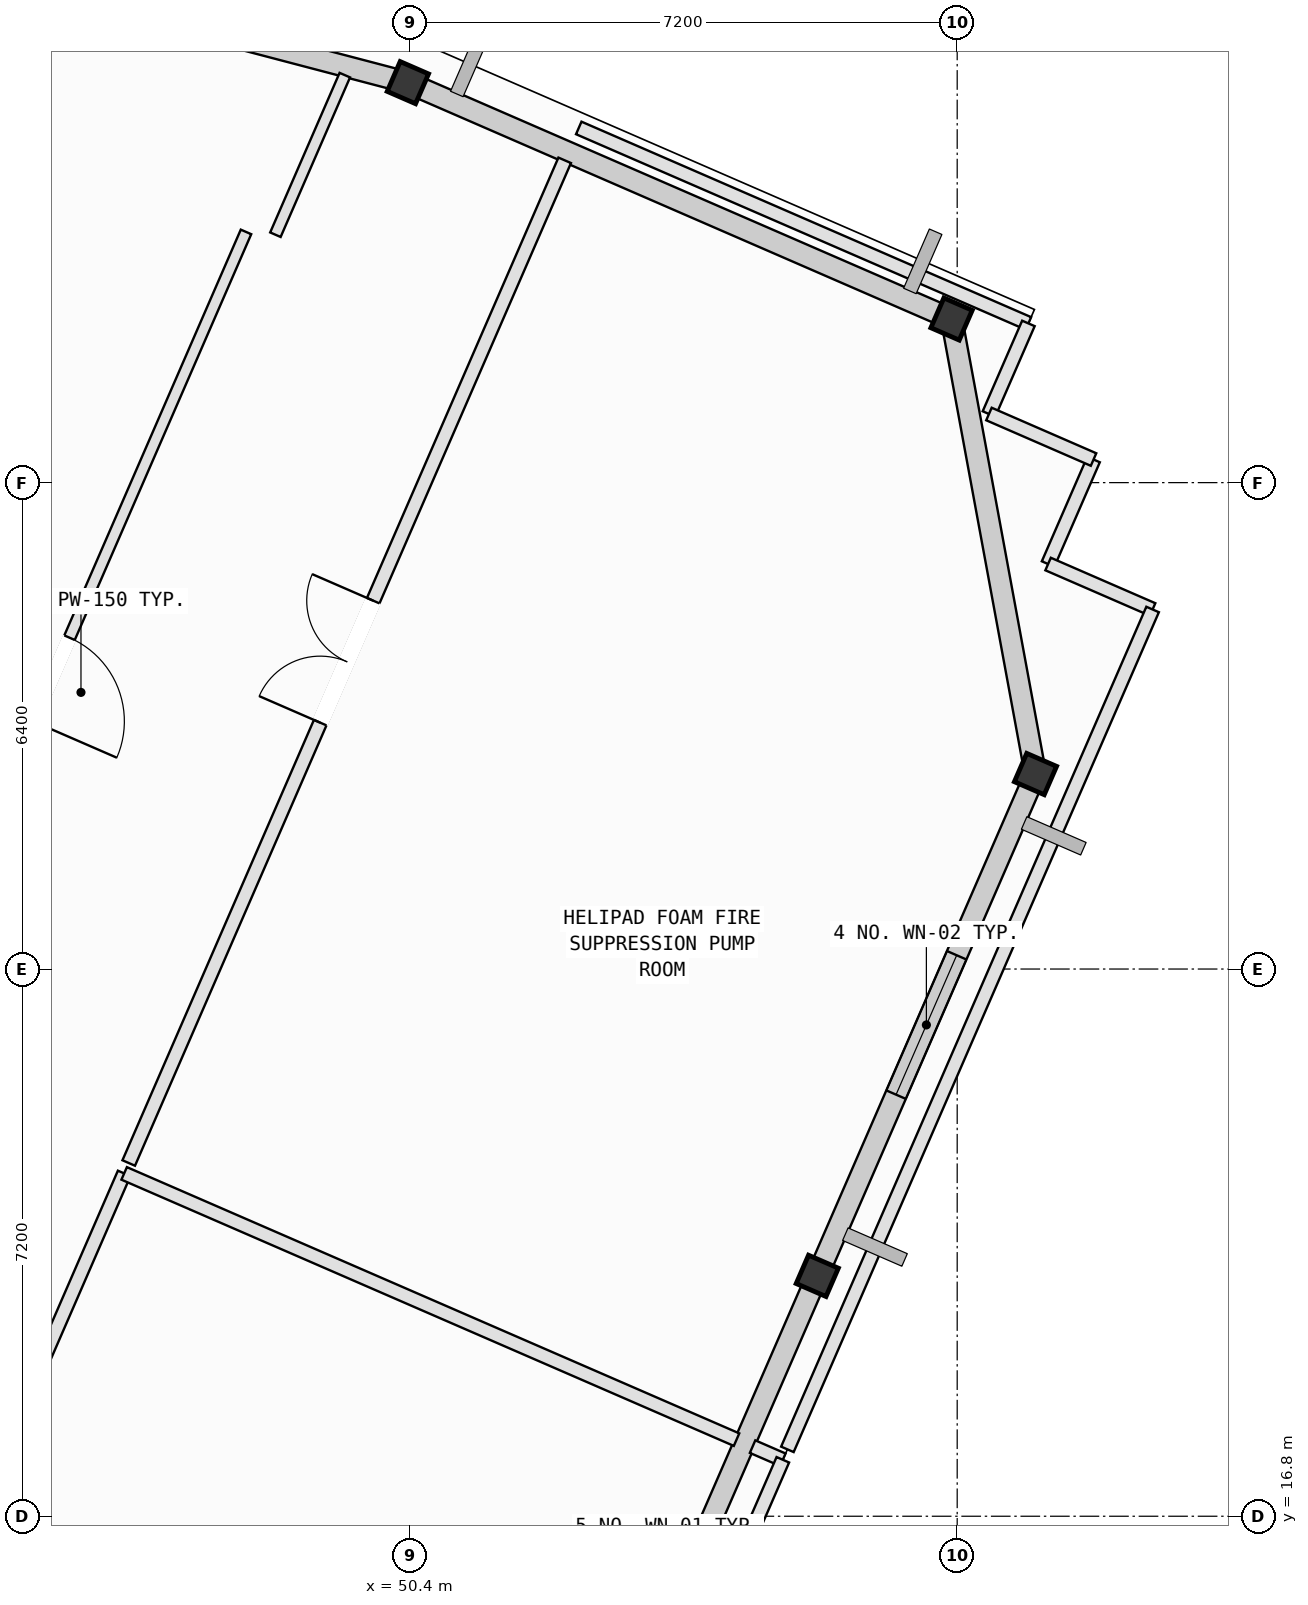
"""IFC4 building model, lengths in metres.
Left out: names, types, materials, properties, quantities, classifications, styles, units other than length and angle.
Written with IfcOpenShell. Run it as: python <this file> out.ifc"""

import sys

from ifc_helpers import new_model, si_unit, direction, frame, frame_2d, origin, origin_2d, place, context, subcontext, project, spatial, rectangle, i_section, extrude, element, fill, save


model = new_model("IFC4")
c1 = context("Model", 3, precision=1e-05, world=origin(), true_north=direction((0.0, 1.0)))
c2 = subcontext(c1, "Body", "Model", "MODEL_VIEW")
j1 = project(units=[si_unit("LENGTHUNIT", "METRE"), si_unit("PLANEANGLEUNIT", "RADIAN")], contexts=[c1])
p1 = place(None, origin())
s1 = spatial("IfcSite", under=j1, at=p1, CompositionType="ELEMENT")
p2 = place(p1, origin())
s2 = spatial("IfcBuilding", under=s1, at=p2, CompositionType="ELEMENT")
p3 = place(p2, frame((0.0, 0.0, 342.6)))
s3 = spatial("IfcBuildingStorey", under=s2, at=p3, CompositionType="ELEMENT", Elevation=342.6)
for number, where, z_axis, x_axis in (
    (1, (55.759, 19.963, 0.002), (0.0, 0.0, 1.0), (0.399, 0.917, 0.0)),
    (2, (58.63, 26.566, 0.002), (0.0, 0.0, 1.0), (0.399, 0.917, 0.0)),
    (3, (57.526, 32.553, 0.002), (0.0, 0.0, 1.0), (-0.917, 0.399, 0.0)),
    (4, (50.373, 35.663, 0.002), (0.0, 0.0, 1.0), (-0.917, 0.399, 0.0)),
):
    element("IfcColumn", number, at=place(p3, frame(where, z_axis=z_axis, x_axis=x_axis)), inside=s3, PredefinedType="COLUMN", context=c2, shape_type="SweptSolid", body=[
        extrude(i_section(OverallWidth=0.407, OverallDepth=0.428, WebThickness=0.02, FlangeThickness=0.035, FilletRadius=0.022, at=origin_2d()), origin(), (0.0, 0.0, 1.0), 5.196),
    ])
p4 = place(p3, frame((55.759, 19.963, 0.0), z_axis=(0.0, 0.0, 1.0), x_axis=(-0.398734790782, -0.917066282566, 0.0)))
e5 = element("IfcWall", 5, at=p4, inside=s3, PredefinedType="SOLIDWALL", context=c2, shape_type="SweptSolid", body=[
    extrude(rectangle(XDim=7.2, YDim=0.28, at=frame_2d((3.6, 0.0))), origin(), (0.0, 0.0, 1.0), 4.335),
])
p5 = place(p4, frame((4.112, 0.0, 0.75)))
e6 = element("IfcOpeningElement", 6, at=p5, cuts=e5, PredefinedType="OPENING", context=c2, shape_type="SweptSolid", body=[
    extrude(rectangle(XDim=1.6, YDim=1.95, at=frame_2d((0.8, 0.975))), frame((0.0, 0.15, 0.0), z_axis=(0.0, -1.0, 0.0), x_axis=(1.0, 0.0, 0.0)), (0.0, 0.0, 1.0), 0.3),
])
p6 = place(p3, frame((58.63, 26.566, 0.0), z_axis=(0.0, 0.0, 1.0), x_axis=(-0.398763307949, -0.91705388295, 0.0)))
e7 = element("IfcWall", 7, at=p6, inside=s3, PredefinedType="SOLIDWALL", context=c2, shape_type="SweptSolid", body=[
    extrude(rectangle(XDim=7.2, YDim=0.28, at=frame_2d((3.6, 0.0))), origin(), (0.0, 0.0, 1.0), 4.335),
])
p7 = place(p6, frame((2.6, 0.0, 0.75)))
e8 = element("IfcOpeningElement", 8, at=p7, cuts=e7, PredefinedType="OPENING", context=c2, shape_type="SweptSolid", body=[
    extrude(rectangle(XDim=2.0, YDim=1.95, at=frame_2d((1.0, 0.975))), frame((0.0, 0.15, 0.0), z_axis=(0.0, -1.0, 0.0), x_axis=(1.0, 0.0, 0.0)), (0.0, 0.0, 1.0), 0.3),
])
p8 = place(p3, frame((57.526, 32.552, 0.0), z_axis=(0.0, 0.0, 1.0), x_axis=(0.181386981443, -0.983411797246, 0.0)))
e9 = element("IfcWall", 9, at=p8, inside=s3, PredefinedType="SOLIDWALL", context=c2, shape_type="SweptSolid", body=[
    extrude(rectangle(XDim=6.088, YDim=0.28, at=frame_2d((3.044, 0.0))), origin(), (0.0, 0.0, 1.0), 4.335),
])
p9 = place(p3, frame((50.373, 35.663, 0.0), z_axis=(0.0, 0.0, 1.0), x_axis=(0.917055127211, -0.398760446454, 0.0)))
e10 = element("IfcWall", 10, at=p9, inside=s3, PredefinedType="SOLIDWALL", context=c2, shape_type="SweptSolid", body=[
    extrude(rectangle(XDim=7.8, YDim=0.28, at=frame_2d((3.9, 0.0))), origin(), (0.0, 0.0, 1.0), 4.335),
])
p10 = place(p3, frame((40.879, 38.155, 0.0), z_axis=(0.0, 0.0, 1.0), x_axis=(0.967228369271, -0.253908018143, 0.0)))
e11 = element("IfcWall", 11, at=p10, inside=s3, PredefinedType="SOLIDWALL", context=c2, shape_type="SweptSolid", body=[
    extrude(rectangle(XDim=9.815, YDim=0.28, at=frame_2d((4.908, 0.0))), origin(), (0.0, 0.0, 1.0), 4.335),
])
p11 = place(p3, frame((44.32, 15.975, 0.0), z_axis=(0.0, 0.0, 1.0), x_axis=(0.398704630949, 0.917079395287, 0.0)))
e12 = element("IfcWall", 12, at=p11, inside=s3, PredefinedType="PARTITIONING", context=c2, shape_type="SweptSolid", body=[
    extrude(rectangle(XDim=5.818, YDim=0.18, at=frame_2d((2.909, 0.0))), origin(), (0.0, 0.0, 1.0), 4.485),
])
p12 = place(p3, frame((46.64, 21.311, 0.0), z_axis=(0.0, 0.0, 1.0), x_axis=(0.917077124734, -0.398709853514, 0.0)))
e13 = element("IfcWall", 13, at=p12, inside=s3, PredefinedType="PARTITIONING", context=c2, shape_type="SweptSolid", body=[
    extrude(rectangle(XDim=8.786, YDim=0.18, at=frame_2d((4.393, 0.0))), origin(), (0.0, 0.0, 1.0), 4.85),
])
p13 = place(p3, frame((54.908, 17.716, 0.0), z_axis=(0.0, 0.0, 1.0), x_axis=(0.917007436542, -0.398870105833, 0.0)))
e14 = element("IfcWall", 14, at=p13, inside=s3, PredefinedType="PARTITIONING", context=c2, shape_type="SweptSolid", body=[
    extrude(rectangle(XDim=0.434, YDim=0.18, at=frame_2d((0.217, 0.0))), origin(), (0.0, 0.0, 1.0), 4.85),
])
p14 = place(p3, frame((55.306, 17.543, 0.0), z_axis=(0.0, 0.0, 1.0), x_axis=(-0.398733054763, -0.917067037375, 0.0)))
e15 = element("IfcWall", 15, at=p14, inside=s3, PredefinedType="PARTITIONING", context=c2, shape_type="SweptSolid", body=[
    extrude(rectangle(XDim=27.0, YDim=0.18, at=frame_2d((13.5, 0.0))), origin(), (0.0, 0.0, 1.0), 4.85),
])
for number, where, z_axis, x_axis in (
    (16, (59.394, 30.704, 0.0), (0.0, 0.0, 1.0), (-0.399, -0.917, 0.0)),
    (17, (58.796, 29.329, 0.0), (0.0, 0.0, 1.0), (0.917, -0.399, 0.0)),
):
    element("IfcWall", number, at=place(p3, frame(where, z_axis=z_axis, x_axis=x_axis)), inside=s3, PredefinedType="PARTITIONING", context=c2, shape_type="SweptSolid", body=[
        extrude(rectangle(XDim=1.5, YDim=0.18, at=frame_2d((0.75, 0.0))), origin(), (0.0, 0.0, 1.0), 4.85),
    ])
p15 = place(p3, frame((60.171, 28.731, 0.0), z_axis=(0.0, 0.0, 1.0), x_axis=(-0.398735742108, -0.917065868935, 0.0)))
e18 = element("IfcWall", 18, at=p15, inside=s3, PredefinedType="PARTITIONING", context=c2, shape_type="SweptSolid", body=[
    extrude(rectangle(XDim=12.051, YDim=0.18, at=frame_2d((6.025, 0.0))), origin(), (0.0, 0.0, 1.0), 4.85),
])
p16 = place(p3, frame((46.7, 21.448, 0.0), z_axis=(0.0, 0.0, 1.0), x_axis=(0.398723008689, 0.917071405258, 0.0)))
e19 = element("IfcWall", 19, at=p16, inside=s3, PredefinedType="PARTITIONING", context=c2, shape_type="SweptSolid", body=[
    extrude(rectangle(XDim=14.386, YDim=0.18, at=frame_2d((7.193, 0.0))), origin(), (0.0, 0.0, 1.0), 4.85),
])
p17 = place(p16, frame((6.318, 0.0, 0.0)))
e20 = element("IfcOpeningElement", 20, at=p17, cuts=e19, PredefinedType="OPENING", context=c2, shape_type="SweptSolid", body=[
    extrude(rectangle(XDim=1.75, YDim=2.2, at=frame_2d((0.875, 1.1))), frame((0.0, 0.1, 0.0), z_axis=(0.0, -1.0, 0.0), x_axis=(1.0, 0.0, 0.0)), (0.0, 0.0, 1.0), 0.2),
])
p18 = place(p3, frame((52.621, 35.067, 0.0), z_axis=(0.0, 0.0, 1.0), x_axis=(0.917092918999, -0.398673522975, 0.0)))
e21 = element("IfcWall", 21, at=p18, inside=s3, PredefinedType="PARTITIONING", context=c2, shape_type="SweptSolid", body=[
    extrude(rectangle(XDim=6.451, YDim=0.18, at=frame_2d((3.226, 0.0))), origin(), (0.0, 0.0, 1.0), 4.335),
])
p19 = place(p3, frame((58.537, 32.495, 0.0), z_axis=(0.0, 0.0, 1.0), x_axis=(-0.3991929402, -0.916866945906, 0.0)))
e22 = element("IfcWall", 22, at=p19, inside=s3, PredefinedType="PARTITIONING", context=c2, shape_type="SweptSolid", body=[
    extrude(rectangle(XDim=1.3, YDim=0.18, at=frame_2d((0.65, 0.0))), origin(), (0.0, 0.0, 1.0), 4.85),
])
p20 = place(p3, frame((58.018, 31.303, 0.0), z_axis=(0.0, 0.0, 1.0), x_axis=(0.91691738696, -0.399077067107, 0.0)))
e23 = element("IfcWall", 23, at=p20, inside=s3, PredefinedType="PARTITIONING", context=c2, shape_type="SweptSolid", body=[
    extrude(rectangle(XDim=1.501, YDim=0.18, at=frame_2d((0.75, 0.0))), origin(), (0.0, 0.0, 1.0), 4.85),
])
p21 = place(p3, frame((48.243, 33.699, 0.0), z_axis=(0.0, 0.0, 1.0), x_axis=(-0.398758777505, -0.917055852913, 0.0)))
e24 = element("IfcWall", 24, at=p21, inside=s3, PredefinedType="PARTITIONING", context=c2, shape_type="SweptSolid", body=[
    extrude(rectangle(XDim=12.844, YDim=0.15, at=frame_2d((6.422, 0.0))), origin(), (0.0, 0.0, 1.0), 3.835),
])
p22 = place(p21, frame((5.822, 0.0, 0.0)))
e25 = element("IfcOpeningElement", 25, at=p22, cuts=e24, PredefinedType="OPENING", context=c2, shape_type="SweptSolid", body=[
    extrude(rectangle(XDim=1.2, YDim=2.15, at=frame_2d((0.6, 1.075))), frame((0.0, 0.085, 0.0), z_axis=(0.0, -1.0, 0.0), x_axis=(1.0, 0.0, 0.0)), (0.0, 0.0, 1.0), 0.17),
])
p23 = place(p3, frame((49.543, 35.762, 0.0), z_axis=(0.0, 0.0, 1.0), x_axis=(-0.398765098315, -0.917053104441, 0.0)))
e26 = element("IfcWall", 26, at=p23, inside=s3, PredefinedType="PARTITIONING", context=c2, shape_type="SweptSolid", body=[
    extrude(rectangle(XDim=2.29, YDim=0.15, at=frame_2d((1.145, 0.0))), origin(), (0.0, 0.0, 1.0), 3.835),
])
p24 = place(p7, origin())
e27 = element("IfcWindow", 27, at=p24, inside=s3, PartitioningType="SINGLE_PANEL", PredefinedType="WINDOW", context=c2, shape_type="SweptSolid", body=[
    extrude(rectangle(XDim=2.0, YDim=1.95, at=frame_2d((1.0, 0.975))), frame((0.0, 0.03, 0.0), z_axis=(0.0, -1.0, 0.0), x_axis=(1.0, 0.0, 0.0)), (0.0, 0.0, 1.0), 0.06),
])
fill(e8, e27)
p25 = place(p17, origin())
e28 = element("IfcDoor", 28, at=p25, inside=s3, OperationType="DOUBLE_DOOR_SINGLE_SWING", PredefinedType="DOOR", context=c2, shape_type="SweptSolid", body=[
    extrude(rectangle(XDim=1.75, YDim=2.2, at=frame_2d((0.875, 1.1))), frame((0.0, 0.025, 0.0), z_axis=(0.0, -1.0, 0.0), x_axis=(1.0, 0.0, 0.0)), (0.0, 0.0, 1.0), 0.05),
])
fill(e20, e28)
p26 = place(p22, origin())
e29 = element("IfcDoor", 29, at=p26, inside=s3, OperationType="SINGLE_SWING_RIGHT", PredefinedType="DOOR", context=c2, shape_type="SweptSolid", body=[
    extrude(rectangle(XDim=1.2, YDim=2.15, at=frame_2d((0.6, 1.075))), frame((0.0, 0.025, 0.0), z_axis=(0.0, -1.0, 0.0), x_axis=(1.0, 0.0, 0.0)), (0.0, 0.0, 1.0), 0.05),
])
fill(e25, e29)
save(model, sys.argv[1])
